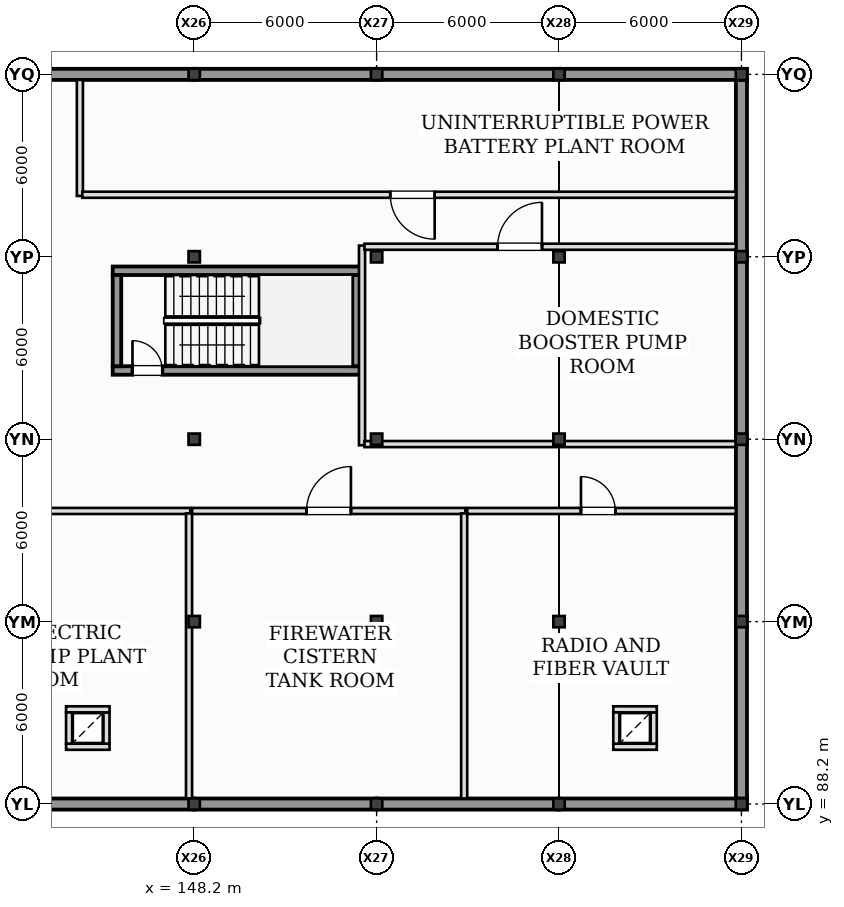
"""IFC4 building model, lengths in metres.
Left out: names, types, materials, properties, quantities, classifications, styles, units other than length and angle.
Written with IfcOpenShell. Run it as: python <this file> out.ifc"""

import sys

from ifc_helpers import new_model, si_unit, direction, frame, frame_2d, origin, origin_2d, place, context, subcontext, project, spatial, rectangle, i_section, extrude, element, fill, save


model = new_model("IFC4")
c1 = context("Model", 3, precision=1e-05, world=origin(), true_north=direction((0.0, 1.0)))
c2 = subcontext(c1, "Body", "Model", "MODEL_VIEW")
j1 = project(units=[si_unit("LENGTHUNIT", "METRE"), si_unit("PLANEANGLEUNIT", "RADIAN")], contexts=[c1])
p1 = place(None, origin())
s1 = spatial("IfcSite", under=j1, at=p1, CompositionType="ELEMENT")
p2 = place(p1, origin())
s2 = spatial("IfcBuilding", under=s1, at=p2, CompositionType="ELEMENT")
p3 = place(p2, frame((0.0, 0.0, -4.2)))
s3 = spatial("IfcBuildingStorey", under=s2, at=p3, CompositionType="ELEMENT", Elevation=-4.2)
for number, where, z_axis, x_axis in (
    (1, (148.2, 88.2, -0.45), (0.0, 0.0, 1.0), (1.0, 0.0, 0.0)),
    (2, (148.2, 94.2, -0.45), (0.0, 0.0, 1.0), (1.0, 0.0, 0.0)),
    (3, (148.2, 100.2, -0.45), (0.0, 0.0, 1.0), (1.0, 0.0, 0.0)),
    (4, (148.2, 106.2, -0.45), (0.0, 0.0, 1.0), (1.0, 0.0, 0.0)),
    (5, (148.2, 112.2, -0.45), (0.0, 0.0, 1.0), (1.0, 0.0, 0.0)),
    (6, (154.2, 88.2, -0.45), (0.0, 0.0, 1.0), (1.0, 0.0, 0.0)),
    (7, (154.2, 94.2, -0.45), (0.0, 0.0, 1.0), (1.0, 0.0, 0.0)),
    (8, (154.2, 100.2, -0.45), (0.0, 0.0, 1.0), (1.0, 0.0, 0.0)),
    (9, (154.2, 106.2, -0.45), (0.0, 0.0, 1.0), (1.0, 0.0, 0.0)),
    (10, (154.2, 112.2, -0.45), (0.0, 0.0, 1.0), (1.0, 0.0, 0.0)),
    (11, (160.2, 88.2, -0.45), (0.0, 0.0, 1.0), (1.0, 0.0, 0.0)),
    (12, (160.2, 94.2, -0.45), (0.0, 0.0, 1.0), (1.0, 0.0, 0.0)),
    (13, (160.2, 100.2, -0.45), (0.0, 0.0, 1.0), (1.0, 0.0, 0.0)),
    (14, (160.2, 106.2, -0.45), (0.0, 0.0, 1.0), (1.0, 0.0, 0.0)),
    (15, (160.2, 112.2, -0.45), (0.0, 0.0, 1.0), (1.0, 0.0, 0.0)),
    (16, (166.2, 88.2, -0.45), (0.0, 0.0, 1.0), (1.0, 0.0, 0.0)),
    (17, (166.2, 94.2, -0.45), (0.0, 0.0, 1.0), (1.0, 0.0, 0.0)),
    (18, (166.2, 100.2, -0.45), (0.0, 0.0, 1.0), (1.0, 0.0, 0.0)),
    (19, (166.2, 106.2, -0.45), (0.0, 0.0, 1.0), (1.0, 0.0, 0.0)),
    (20, (166.2, 112.2, -0.45), (0.0, 0.0, 1.0), (1.0, 0.0, 0.0)),
):
    element("IfcColumn", number, at=place(p3, frame(where, z_axis=z_axis, x_axis=x_axis)), inside=s3, PredefinedType="COLUMN", context=c2, shape_type="SweptSolid", body=[
        extrude(i_section(OverallWidth=0.374, OverallDepth=0.372, WebThickness=0.016, FlangeThickness=0.026, at=origin_2d()), origin(), (0.0, 0.0, 1.0), 4.65),
    ])
for number, where, z_axis, x_axis in (
    (21, (142.201, 88.2, 0.0), (0.0, 0.0, 1.0), (1.0, 0.0, 0.0)),
    (22, (148.201, 88.2, 0.0), (0.0, 0.0, 1.0), (1.0, 0.0, 0.0)),
    (23, (154.201, 88.2, 0.0), (0.0, 0.0, 1.0), (1.0, 0.0, 0.0)),
):
    element("IfcWall", number, at=place(p3, frame(where, z_axis=z_axis, x_axis=x_axis)), inside=s3, PredefinedType="SHEAR", context=c2, shape_type="SweptSolid", body=[
        extrude(rectangle(XDim=5.998, YDim=0.365, at=frame_2d((2.999, 0.0))), origin(), (0.0, 0.0, 1.0), 3.85),
    ])
p4 = place(p3, frame((160.201, 88.2, 0.0), z_axis=(0.0, 0.0, 1.0), x_axis=(1.0, 0.0, 0.0)))
e24 = element("IfcWall", 24, at=p4, inside=s3, PredefinedType="SHEAR", context=c2, shape_type="SweptSolid", body=[
    extrude(rectangle(XDim=6.182, YDim=0.365, at=frame_2d((3.091, 0.0))), origin(), (0.0, 0.0, 1.0), 3.85),
])
for number, where, z_axis, x_axis in (
    (25, (148.199, 112.2, 0.0), (0.0, 0.0, 1.0), (-1.0, 0.0, 0.0)),
    (26, (154.199, 112.2, 0.0), (0.0, 0.0, 1.0), (-1.0, 0.0, 0.0)),
    (27, (160.199, 112.2, 0.0), (0.0, 0.0, 1.0), (-1.0, 0.0, 0.0)),
):
    element("IfcWall", number, at=place(p3, frame(where, z_axis=z_axis, x_axis=x_axis)), inside=s3, PredefinedType="SHEAR", context=c2, shape_type="SweptSolid", body=[
        extrude(rectangle(XDim=5.998, YDim=0.365, at=frame_2d((2.999, 0.0))), origin(), (0.0, 0.0, 1.0), 3.85),
    ])
p5 = place(p3, frame((166.383, 112.2, 0.0), z_axis=(0.0, 0.0, 1.0), x_axis=(-1.0, 0.0, 0.0)))
e28 = element("IfcWall", 28, at=p5, inside=s3, PredefinedType="SHEAR", context=c2, shape_type="SweptSolid", body=[
    extrude(rectangle(XDim=6.182, YDim=0.365, at=frame_2d((3.091, 0.0))), origin(), (0.0, 0.0, 1.0), 3.85),
])
p6 = place(p3, frame((166.2, 88.385, 0.0), z_axis=(0.0, 0.0, 1.0), x_axis=(0.0, 1.0, 0.0)))
e29 = element("IfcWall", 29, at=p6, inside=s3, PredefinedType="SHEAR", context=c2, shape_type="SweptSolid", body=[
    extrude(rectangle(XDim=5.814, YDim=0.365, at=frame_2d((2.907, 0.0))), origin(), (0.0, 0.0, 1.0), 3.85),
])
for number, where, z_axis, x_axis in (
    (30, (166.2, 94.201, 0.0), (0.0, 0.0, 1.0), (0.0, 1.0, 0.0)),
    (31, (166.2, 100.201, 0.0), (0.0, 0.0, 1.0), (0.0, 1.0, 0.0)),
):
    element("IfcWall", number, at=place(p3, frame(where, z_axis=z_axis, x_axis=x_axis)), inside=s3, PredefinedType="SHEAR", context=c2, shape_type="SweptSolid", body=[
        extrude(rectangle(XDim=5.998, YDim=0.365, at=frame_2d((2.999, 0.0))), origin(), (0.0, 0.0, 1.0), 3.85),
    ])
p7 = place(p3, frame((166.2, 106.201, 0.0), z_axis=(0.0, 0.0, 1.0), x_axis=(0.0, 1.0, 0.0)))
e32 = element("IfcWall", 32, at=p7, inside=s3, PredefinedType="SHEAR", context=c2, shape_type="SweptSolid", body=[
    extrude(rectangle(XDim=5.814, YDim=0.365, at=frame_2d((2.907, 0.0))), origin(), (0.0, 0.0, 1.0), 3.85),
])
p8 = place(p3, frame((145.52, 102.46, 0.0), z_axis=(0.0, 0.0, 1.0), x_axis=(1.0, 0.0, 0.0)))
e33 = element("IfcWall", 33, at=p8, inside=s3, PredefinedType="SHEAR", context=c2, shape_type="SweptSolid", body=[
    extrude(rectangle(XDim=8.16, YDim=0.28, at=frame_2d((4.08, 0.0))), origin(), (0.0, 0.0, 1.0), 4.2),
])
p9 = place(p8, frame((0.65, 0.0, 0.0)))
e34 = element("IfcOpeningElement", 34, at=p9, cuts=e33, PredefinedType="OPENING", context=c2, shape_type="SweptSolid", body=[
    extrude(rectangle(XDim=0.98, YDim=2.15, at=frame_2d((0.49, 1.075))), frame((0.0, 0.15, 0.0), z_axis=(0.0, -1.0, 0.0), x_axis=(1.0, 0.0, 0.0)), (0.0, 0.0, 1.0), 0.3),
])
p10 = place(p3, frame((153.68, 105.74, 0.0), z_axis=(0.0, 0.0, 1.0), x_axis=(-1.0, 0.0, 0.0)))
e35 = element("IfcWall", 35, at=p10, inside=s3, PredefinedType="SHEAR", context=c2, shape_type="SweptSolid", body=[
    extrude(rectangle(XDim=8.16, YDim=0.28, at=frame_2d((4.08, 0.0))), origin(), (0.0, 0.0, 1.0), 4.2),
])
for number, where, z_axis, x_axis in (
    (36, (145.66, 105.6, 0.0), (0.0, 0.0, 1.0), (0.0, -1.0, 0.0)),
    (37, (153.54, 102.6, 0.0), (0.0, 0.0, 1.0), (0.0, 1.0, 0.0)),
):
    element("IfcWall", number, at=place(p3, frame(where, z_axis=z_axis, x_axis=x_axis)), inside=s3, PredefinedType="SHEAR", context=c2, shape_type="SweptSolid", body=[
        extrude(rectangle(XDim=3.0, YDim=0.28, at=frame_2d((1.5, 0.0))), origin(), (0.0, 0.0, 1.0), 4.2),
    ])
p11 = place(p3, frame((143.985, 90.085, 0.0), z_axis=(0.0, 0.0, 1.0), x_axis=(1.0, 0.0, 0.0)))
e38 = element("IfcWall", 38, at=p11, inside=s3, PredefinedType="PARTITIONING", context=c2, shape_type="SweptSolid", body=[
    extrude(rectangle(XDim=1.43, YDim=0.2, at=frame_2d((0.715, 0.0))), origin(), (0.0, 0.0, 1.0), 3.79),
])
p12 = place(p3, frame((145.315, 90.185, 0.0), z_axis=(0.0, 0.0, 1.0), x_axis=(0.0, 1.0, 0.0)))
e39 = element("IfcWall", 39, at=p12, inside=s3, PredefinedType="PARTITIONING", context=c2, shape_type="SweptSolid", body=[
    extrude(rectangle(XDim=1.03, YDim=0.2, at=frame_2d((0.515, 0.0))), origin(), (0.0, 0.0, 1.0), 3.79),
])
p13 = place(p3, frame((145.415, 91.315, 0.0), z_axis=(0.0, 0.0, 1.0), x_axis=(-1.0, 0.0, 0.0)))
e40 = element("IfcWall", 40, at=p13, inside=s3, PredefinedType="PARTITIONING", context=c2, shape_type="SweptSolid", body=[
    extrude(rectangle(XDim=1.43, YDim=0.2, at=frame_2d((0.715, 0.0))), origin(), (0.0, 0.0, 1.0), 3.79),
])
p14 = place(p3, frame((144.085, 91.215, 0.0), z_axis=(0.0, 0.0, 1.0), x_axis=(0.0, -1.0, 0.0)))
e41 = element("IfcWall", 41, at=p14, inside=s3, PredefinedType="PARTITIONING", context=c2, shape_type="SweptSolid", body=[
    extrude(rectangle(XDim=1.03, YDim=0.2, at=frame_2d((0.515, 0.0))), origin(), (0.0, 0.0, 1.0), 3.79),
])
p15 = place(p3, frame((161.985, 90.085, 0.0), z_axis=(0.0, 0.0, 1.0), x_axis=(1.0, 0.0, 0.0)))
e42 = element("IfcWall", 42, at=p15, inside=s3, PredefinedType="PARTITIONING", context=c2, shape_type="SweptSolid", body=[
    extrude(rectangle(XDim=1.43, YDim=0.2, at=frame_2d((0.715, 0.0))), origin(), (0.0, 0.0, 1.0), 3.79),
])
p16 = place(p3, frame((163.315, 90.185, 0.0), z_axis=(0.0, 0.0, 1.0), x_axis=(0.0, 1.0, 0.0)))
e43 = element("IfcWall", 43, at=p16, inside=s3, PredefinedType="PARTITIONING", context=c2, shape_type="SweptSolid", body=[
    extrude(rectangle(XDim=1.03, YDim=0.2, at=frame_2d((0.515, 0.0))), origin(), (0.0, 0.0, 1.0), 3.79),
])
p17 = place(p3, frame((163.415, 91.315, 0.0), z_axis=(0.0, 0.0, 1.0), x_axis=(-1.0, 0.0, 0.0)))
e44 = element("IfcWall", 44, at=p17, inside=s3, PredefinedType="PARTITIONING", context=c2, shape_type="SweptSolid", body=[
    extrude(rectangle(XDim=1.43, YDim=0.2, at=frame_2d((0.715, 0.0))), origin(), (0.0, 0.0, 1.0), 3.79),
])
p18 = place(p3, frame((162.085, 91.215, 0.0), z_axis=(0.0, 0.0, 1.0), x_axis=(0.0, -1.0, 0.0)))
e45 = element("IfcWall", 45, at=p18, inside=s3, PredefinedType="PARTITIONING", context=c2, shape_type="SweptSolid", body=[
    extrude(rectangle(XDim=1.03, YDim=0.2, at=frame_2d((0.515, 0.0))), origin(), (0.0, 0.0, 1.0), 3.79),
])
p19 = place(p3, frame((136.13, 97.84, 0.0), z_axis=(0.0, 0.0, 1.0), x_axis=(1.0, 0.0, 0.0)))
e46 = element("IfcWall", 46, at=p19, inside=s3, PredefinedType="PARTITIONING", context=c2, shape_type="SweptSolid", body=[
    extrude(rectangle(XDim=11.94, YDim=0.2, at=frame_2d((5.97, 0.0))), origin(), (0.0, 0.0, 1.0), 3.79),
])
p20 = place(p19, frame((5.24, 0.0, 0.0)))
e47 = element("IfcOpeningElement", 47, at=p20, cuts=e46, PredefinedType="OPENING", context=c2, shape_type="SweptSolid", body=[
    extrude(rectangle(XDim=1.46, YDim=2.3, at=frame_2d((0.73, 1.15))), frame((0.0, 0.11, 0.0), z_axis=(0.0, -1.0, 0.0), x_axis=(1.0, 0.0, 0.0)), (0.0, 0.0, 1.0), 0.22),
])
p21 = place(p3, frame((148.03, 97.76, 0.0), z_axis=(0.0, 0.0, 1.0), x_axis=(0.0, -1.0, 0.0)))
e48 = element("IfcWall", 48, at=p21, inside=s3, PredefinedType="PARTITIONING", context=c2, shape_type="SweptSolid", body=[
    extrude(rectangle(XDim=9.377, YDim=0.2, at=frame_2d((4.689, 0.0))), origin(), (0.0, 0.0, 1.0), 3.79),
])
p22 = place(p3, frame((148.13, 97.84, 0.0), z_axis=(0.0, 0.0, 1.0), x_axis=(1.0, 0.0, 0.0)))
e49 = element("IfcWall", 49, at=p22, inside=s3, PredefinedType="PARTITIONING", context=c2, shape_type="SweptSolid", body=[
    extrude(rectangle(XDim=8.99, YDim=0.2, at=frame_2d((4.495, 0.0))), origin(), (0.0, 0.0, 1.0), 3.79),
])
p23 = place(p22, frame((3.765, 0.0, 0.0)))
e50 = element("IfcOpeningElement", 50, at=p23, cuts=e49, PredefinedType="OPENING", context=c2, shape_type="SweptSolid", body=[
    extrude(rectangle(XDim=1.46, YDim=2.3, at=frame_2d((0.73, 1.15))), frame((0.0, 0.11, 0.0), z_axis=(0.0, -1.0, 0.0), x_axis=(1.0, 0.0, 0.0)), (0.0, 0.0, 1.0), 0.22),
])
p24 = place(p3, frame((157.08, 97.76, 0.0), z_axis=(0.0, 0.0, 1.0), x_axis=(0.0, -1.0, 0.0)))
e51 = element("IfcWall", 51, at=p24, inside=s3, PredefinedType="PARTITIONING", context=c2, shape_type="SweptSolid", body=[
    extrude(rectangle(XDim=9.377, YDim=0.2, at=frame_2d((4.689, 0.0))), origin(), (0.0, 0.0, 1.0), 3.79),
])
p25 = place(p3, frame((157.18, 97.84, 0.0), z_axis=(0.0, 0.0, 1.0), x_axis=(1.0, 0.0, 0.0)))
e52 = element("IfcWall", 52, at=p25, inside=s3, PredefinedType="PARTITIONING", context=c2, shape_type="SweptSolid", body=[
    extrude(rectangle(XDim=8.838, YDim=0.2, at=frame_2d((4.419, 0.0))), origin(), (0.0, 0.0, 1.0), 3.79),
])
p26 = place(p25, frame((3.742, 0.0, 0.0)))
e53 = element("IfcOpeningElement", 53, at=p26, cuts=e52, PredefinedType="OPENING", context=c2, shape_type="SweptSolid", body=[
    extrude(rectangle(XDim=1.13, YDim=2.18, at=frame_2d((0.565, 1.09))), frame((0.0, 0.11, 0.0), z_axis=(0.0, -1.0, 0.0), x_axis=(1.0, 0.0, 0.0)), (0.0, 0.0, 1.0), 0.22),
])
p27 = place(p3, frame((144.44, 108.2, 0.0), z_axis=(0.0, 0.0, 1.0), x_axis=(0.0, 1.0, 0.0)))
e54 = element("IfcWall", 54, at=p27, inside=s3, PredefinedType="PARTITIONING", context=c2, shape_type="SweptSolid", body=[
    extrude(rectangle(XDim=3.818, YDim=0.2, at=frame_2d((1.909, 0.0))), origin(), (0.0, 0.0, 1.0), 3.79),
])
p28 = place(p3, frame((166.018, 108.24, 0.0), z_axis=(0.0, 0.0, 1.0), x_axis=(-1.0, 0.0, 0.0)))
e55 = element("IfcWall", 55, at=p28, inside=s3, PredefinedType="PARTITIONING", context=c2, shape_type="SweptSolid", body=[
    extrude(rectangle(XDim=21.498, YDim=0.2, at=frame_2d((10.749, 0.0))), origin(), (0.0, 0.0, 1.0), 3.79),
])
p29 = place(p28, frame((9.908, 0.0, 0.0)))
e56 = element("IfcOpeningElement", 56, at=p29, cuts=e55, PredefinedType="OPENING", context=c2, shape_type="SweptSolid", body=[
    extrude(rectangle(XDim=1.46, YDim=2.3, at=frame_2d((0.73, 1.15))), frame((0.0, 0.11, 0.0), z_axis=(0.0, -1.0, 0.0), x_axis=(1.0, 0.0, 0.0)), (0.0, 0.0, 1.0), 0.22),
])
p30 = place(p3, frame((153.72, 100.0, 0.0), z_axis=(0.0, 0.0, 1.0), x_axis=(0.0, 1.0, 0.0)))
e57 = element("IfcWall", 57, at=p30, inside=s3, PredefinedType="PARTITIONING", context=c2, shape_type="SweptSolid", body=[
    extrude(rectangle(XDim=6.57, YDim=0.2, at=frame_2d((3.285, 0.0))), origin(), (0.0, 0.0, 1.0), 3.79),
])
p31 = place(p3, frame((153.8, 106.53, 0.0), z_axis=(0.0, 0.0, 1.0), x_axis=(1.0, 0.0, 0.0)))
e58 = element("IfcWall", 58, at=p31, inside=s3, PredefinedType="PARTITIONING", context=c2, shape_type="SweptSolid", body=[
    extrude(rectangle(XDim=12.218, YDim=0.2, at=frame_2d((6.109, 0.0))), origin(), (0.0, 0.0, 1.0), 3.79),
])
p32 = place(p31, frame((4.379, 0.0, 0.0)))
e59 = element("IfcOpeningElement", 59, at=p32, cuts=e58, PredefinedType="OPENING", context=c2, shape_type="SweptSolid", body=[
    extrude(rectangle(XDim=1.46, YDim=2.3, at=frame_2d((0.73, 1.15))), frame((0.0, 0.11, 0.0), z_axis=(0.0, -1.0, 0.0), x_axis=(1.0, 0.0, 0.0)), (0.0, 0.0, 1.0), 0.22),
])
p33 = place(p3, frame((166.018, 100.04, 0.0), z_axis=(0.0, 0.0, 1.0), x_axis=(-1.0, 0.0, 0.0)))
e60 = element("IfcWall", 60, at=p33, inside=s3, PredefinedType="PARTITIONING", context=c2, shape_type="SweptSolid", body=[
    extrude(rectangle(XDim=12.218, YDim=0.2, at=frame_2d((6.109, 0.0))), origin(), (0.0, 0.0, 1.0), 3.79),
])
p34 = place(p9, origin())
e61 = element("IfcDoor", 61, at=p34, inside=s3, OperationType="SINGLE_SWING_LEFT", PredefinedType="DOOR", context=c2, shape_type="SweptSolid", body=[
    extrude(rectangle(XDim=0.98, YDim=2.15, at=frame_2d((0.49, 1.075))), frame((0.0, 0.025, 0.0), z_axis=(0.0, -1.0, 0.0), x_axis=(1.0, 0.0, 0.0)), (0.0, 0.0, 1.0), 0.05),
])
fill(e34, e61)
p35 = place(p23, frame((1.46, 0.0, 0.0), z_axis=(0.0, 0.0, 1.0), x_axis=(-1.0, 0.0, 0.0)))
e62 = element("IfcDoor", 62, at=p35, inside=s3, OperationType="SINGLE_SWING_RIGHT", PredefinedType="DOOR", context=c2, shape_type="SweptSolid", body=[
    extrude(rectangle(XDim=1.46, YDim=2.3, at=frame_2d((0.73, 1.15))), frame((0.0, 0.025, 0.0), z_axis=(0.0, -1.0, 0.0), x_axis=(1.0, 0.0, 0.0)), (0.0, 0.0, 1.0), 0.05),
])
fill(e50, e62)
p36 = place(p26, frame((1.13, 0.0, 0.0), z_axis=(0.0, 0.0, 1.0), x_axis=(-1.0, 0.0, 0.0)))
e63 = element("IfcDoor", 63, at=p36, inside=s3, OperationType="SINGLE_SWING_LEFT", PredefinedType="DOOR", context=c2, shape_type="SweptSolid", body=[
    extrude(rectangle(XDim=1.13, YDim=2.18, at=frame_2d((0.565, 1.09))), frame((0.0, 0.025, 0.0), z_axis=(0.0, -1.0, 0.0), x_axis=(1.0, 0.0, 0.0)), (0.0, 0.0, 1.0), 0.05),
])
fill(e53, e63)
p37 = place(p29, frame((1.46, 0.0, 0.0), z_axis=(0.0, 0.0, 1.0), x_axis=(-1.0, 0.0, 0.0)))
e64 = element("IfcDoor", 64, at=p37, inside=s3, OperationType="SINGLE_SWING_LEFT", PredefinedType="DOOR", context=c2, shape_type="SweptSolid", body=[
    extrude(rectangle(XDim=1.46, YDim=2.3, at=frame_2d((0.73, 1.15))), frame((0.0, 0.025, 0.0), z_axis=(0.0, -1.0, 0.0), x_axis=(1.0, 0.0, 0.0)), (0.0, 0.0, 1.0), 0.05),
])
fill(e56, e64)
p38 = place(p32, frame((1.46, 0.0, 0.0), z_axis=(0.0, 0.0, 1.0), x_axis=(-1.0, 0.0, 0.0)))
e65 = element("IfcDoor", 65, at=p38, inside=s3, OperationType="SINGLE_SWING_RIGHT", PredefinedType="DOOR", context=c2, shape_type="SweptSolid", body=[
    extrude(rectangle(XDim=1.46, YDim=2.3, at=frame_2d((0.73, 1.15))), frame((0.0, 0.025, 0.0), z_axis=(0.0, -1.0, 0.0), x_axis=(1.0, 0.0, 0.0)), (0.0, 0.0, 1.0), 0.05),
])
fill(e59, e65)
save(model, sys.argv[1])
